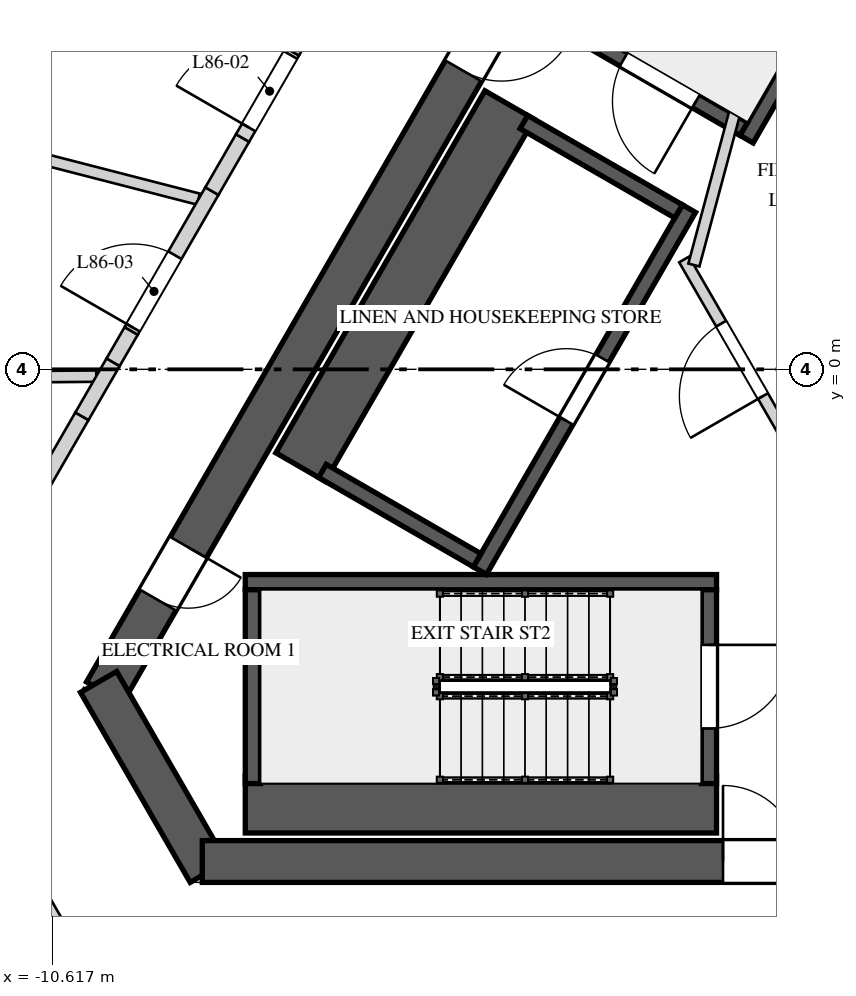
"""IFC4 building model, lengths in metres.
Left out: names, types, materials, properties, quantities, classifications, styles, units other than length and angle.
Written with IfcOpenShell. Run it as: python <this file> out.ifc"""

import sys

from ifc_helpers import new_model, si_unit, direction, frame, frame_2d, origin, place, context, subcontext, project, spatial, polyline, rectangle, outline, extrude, element, fill, save


model = new_model("IFC4")
c1 = context("Model", 3, precision=1e-05, world=origin(), true_north=direction((0.0, 1.0)))
c2 = subcontext(c1, "Body", "Model", "MODEL_VIEW")
j1 = project(units=[si_unit("LENGTHUNIT", "METRE"), si_unit("PLANEANGLEUNIT", "RADIAN")], contexts=[c1])
p1 = place(None, origin())
s1 = spatial("IfcSite", under=j1, at=p1, CompositionType="ELEMENT")
p2 = place(p1, origin())
s2 = spatial("IfcBuilding", under=s1, at=p2, CompositionType="ELEMENT")
p3 = place(p2, frame((0.0, 0.0, 374.9)))
s3 = spatial("IfcBuildingStorey", under=s2, at=p3, CompositionType="ELEMENT", Elevation=374.9)
p4 = place(p3, frame((-1.285, 10.725, 0.0), z_axis=(0.0, 0.0, 1.0), x_axis=(-0.499994590896, -0.86602852671, 0.0)))
e1 = element("IfcWall", 1, at=p4, inside=s3, PredefinedType="SHEAR", context=c2, shape_type="SweptSolid", body=[
    extrude(rectangle(XDim=17.292, YDim=0.55, at=frame_2d((8.646, 0.0))), origin(), (0.0, 0.0, 1.0), 6.0),
])
p5 = place(p4, frame((6.851, 0.0, 0.0)))
e2 = element("IfcOpeningElement", 2, at=p5, cuts=e1, PredefinedType="OPENING", context=c2, shape_type="SweptSolid", body=[
    extrude(rectangle(XDim=1.0, YDim=2.4, at=frame_2d((0.5, 1.2))), frame((0.0, 0.285, 0.0), z_axis=(0.0, -1.0, 0.0), x_axis=(1.0, 0.0, 0.0)), (0.0, 0.0, 1.0), 0.57),
])
p6 = place(p4, frame((15.089, 0.0, 0.0)))
e3 = element("IfcOpeningElement", 3, at=p6, cuts=e1, PredefinedType="OPENING", context=c2, shape_type="SweptSolid", body=[
    extrude(rectangle(XDim=0.8, YDim=2.1, at=frame_2d((0.4, 1.05))), frame((0.0, 0.285, 0.0), z_axis=(0.0, -1.0, 0.0), x_axis=(1.0, 0.0, 0.0)), (0.0, 0.0, 1.0), 0.57),
])
p7 = place(p3, frame((-10.01, -4.113, 0.0), z_axis=(0.0, 0.0, 1.0), x_axis=(0.499995765644, -0.866027848477, 0.0)))
e4 = element("IfcWall", 4, at=p7, inside=s3, PredefinedType="SHEAR", context=c2, shape_type="SweptSolid", body=[
    extrude(rectangle(XDim=2.887, YDim=0.55, at=frame_2d((1.443, 0.0))), origin(), (0.0, 0.0, 1.0), 6.0),
])
p8 = place(p3, frame((-8.646, -6.475, 0.0), z_axis=(0.0, 0.0, 1.0), x_axis=(1.0, 0.0, 0.0)))
e5 = element("IfcWall", 5, at=p8, inside=s3, PredefinedType="SHEAR", context=c2, shape_type="SweptSolid", body=[
    extrude(rectangle(XDim=17.292, YDim=0.55, at=frame_2d((8.646, 0.0))), origin(), (0.0, 0.0, 1.0), 6.0),
])
p9 = place(p8, frame((6.851, 0.0, 0.0)))
e6 = element("IfcOpeningElement", 6, at=p9, cuts=e5, PredefinedType="OPENING", context=c2, shape_type="SweptSolid", body=[
    extrude(rectangle(XDim=1.0, YDim=2.4, at=frame_2d((0.5, 1.2))), frame((0.0, 0.285, 0.0), z_axis=(0.0, -1.0, 0.0), x_axis=(1.0, 0.0, 0.0)), (0.0, 0.0, 1.0), 0.57),
])
p10 = place(p3, frame((-13.093, -6.868, 0.0), z_axis=(0.0, 0.0, 1.0), x_axis=(0.669136224502, -0.74313976684, 0.0)))
e7 = element("IfcWall", 7, at=p10, inside=s3, PredefinedType="SOLIDWALL", context=c2, shape_type="SweptSolid", body=[
    extrude(rectangle(XDim=7.314, YDim=0.45, at=frame_2d((3.657, 0.0))), origin(), (0.0, 0.0, 1.0), 5.3),
])
p11 = place(p3, frame((1.615, 8.397, 0.0), z_axis=(0.0, 0.0, 1.0), x_axis=(-0.500009909098, -0.866019682689, 0.0)))
e8 = element("IfcWall", 8, at=p11, inside=s3, PredefinedType="SOLIDWALL", context=c2, shape_type="SweptSolid", body=[
    extrude(rectangle(XDim=6.2, YDim=0.2, at=frame_2d((3.1, 0.0))), origin(), (0.0, 0.0, 1.0), 5.65),
])
p12 = place(p3, frame((-1.521, 3.165, 0.0), z_axis=(0.0, 0.0, 1.0), x_axis=(-0.866030925526, 0.499990435942, 0.0)))
e9 = element("IfcWall", 9, at=p12, inside=s3, PredefinedType="SOLIDWALL", context=c2, shape_type="SweptSolid", body=[
    extrude(rectangle(XDim=2.55, YDim=0.2, at=frame_2d((1.275, 0.0))), origin(), (0.0, 0.0, 1.0), 5.65),
])
p13 = place(p12, frame((0.725, 0.0, 0.0)))
e10 = element("IfcOpeningElement", 10, at=p13, cuts=e9, PredefinedType="OPENING", context=c2, shape_type="SweptSolid", body=[
    extrude(rectangle(XDim=1.1, YDim=2.4, at=frame_2d((0.55, 1.2))), frame((0.0, 0.11, 0.0), z_axis=(0.0, -1.0, 0.0), x_axis=(1.0, 0.0, 0.0)), (0.0, 0.0, 1.0), 0.22),
])
p14 = place(p3, frame((-8.08, -5.725, 0.0), z_axis=(0.0, 0.0, 1.0), x_axis=(1.0, 0.0, 0.0)))
e11 = element("IfcWall", 11, at=p14, inside=s3, PredefinedType="SOLIDWALL", context=c2, shape_type="SweptSolid", body=[
    extrude(rectangle(XDim=6.2, YDim=0.75, at=frame_2d((3.1, 0.0))), origin(), (0.0, 0.0, 1.0), 5.65),
])
p15 = place(p3, frame((-8.08, -2.8, 0.0), z_axis=(0.0, 0.0, 1.0), x_axis=(1.0, 0.0, 0.0)))
e12 = element("IfcWall", 12, at=p15, inside=s3, PredefinedType="SOLIDWALL", context=c2, shape_type="SweptSolid", body=[
    extrude(rectangle(XDim=6.2, YDim=0.2, at=frame_2d((3.1, 0.0))), origin(), (0.0, 0.0, 1.0), 5.65),
])
p16 = place(p3, frame((-7.98, -2.9, 0.0), z_axis=(0.0, 0.0, 1.0), x_axis=(0.0, -1.0, 0.0)))
e13 = element("IfcWall", 13, at=p16, inside=s3, PredefinedType="SOLIDWALL", context=c2, shape_type="SweptSolid", body=[
    extrude(rectangle(XDim=2.55, YDim=0.2, at=frame_2d((1.275, 0.0))), origin(), (0.0, 0.0, 1.0), 5.65),
])
p17 = place(p3, frame((-1.98, -2.9, 0.0), z_axis=(0.0, 0.0, 1.0), x_axis=(0.0, -1.0, 0.0)))
e14 = element("IfcWall", 14, at=p17, inside=s3, PredefinedType="SOLIDWALL", context=c2, shape_type="SweptSolid", body=[
    extrude(rectangle(XDim=2.55, YDim=0.2, at=frame_2d((1.275, 0.0))), origin(), (0.0, 0.0, 1.0), 5.65),
])
p18 = place(p17, frame((0.725, 0.0, 0.0)))
e15 = element("IfcOpeningElement", 15, at=p18, cuts=e14, PredefinedType="OPENING", context=c2, shape_type="SweptSolid", body=[
    extrude(rectangle(XDim=1.1, YDim=2.4, at=frame_2d((0.55, 1.2))), frame((0.0, 0.11, 0.0), z_axis=(0.0, -1.0, 0.0), x_axis=(1.0, 0.0, 0.0)), (0.0, 0.0, 1.0), 0.22),
])
p19 = place(p3, frame((-4.993, -2.648, 0.0), z_axis=(0.0, 0.0, 1.0), x_axis=(0.499996545922, 0.866027397988, 0.0)))
e16 = element("IfcWall", 16, at=p19, inside=s3, PredefinedType="SOLIDWALL", context=c2, shape_type="SweptSolid", body=[
    extrude(rectangle(XDim=5.5, YDim=0.2, at=frame_2d((2.75, 0.0))), origin(), (0.0, 0.0, 1.0), 5.65),
])
p20 = place(p19, frame((2.275, 0.0, 0.0)))
e17 = element("IfcOpeningElement", 17, at=p20, cuts=e16, PredefinedType="OPENING", context=c2, shape_type="SweptSolid", body=[
    extrude(rectangle(XDim=0.95, YDim=2.4, at=frame_2d((0.475, 1.2))), frame((0.0, 0.11, 0.0), z_axis=(0.0, -1.0, 0.0), x_axis=(1.0, 0.0, 0.0)), (0.0, 0.0, 1.0), 0.22),
])
p21 = place(p3, frame((-4.603, 3.477, 0.0), z_axis=(0.0, 0.0, 1.0), x_axis=(-0.500015767406, -0.866016300277, 0.0)))
e18 = element("IfcWall", 18, at=p21, inside=s3, PredefinedType="SOLIDWALL", context=c2, shape_type="SweptSolid", body=[
    extrude(rectangle(XDim=5.5, YDim=0.75, at=frame_2d((2.75, 0.0))), origin(), (0.0, 0.0, 1.0), 5.65),
])
p22 = place(p3, frame((-2.38, 2.078, 0.0), z_axis=(0.0, 0.0, 1.0), x_axis=(-0.866061024631, 0.499938297808, 0.0)))
e19 = element("IfcWall", 19, at=p22, inside=s3, PredefinedType="SOLIDWALL", context=c2, shape_type="SweptSolid", body=[
    extrude(rectangle(XDim=2.35, YDim=0.2, at=frame_2d((1.175, 0.0))), origin(), (0.0, 0.0, 1.0), 5.65),
])
p23 = place(p3, frame((-5.03, -2.512, 0.0), z_axis=(0.0, 0.0, 1.0), x_axis=(-0.866016039709, 0.500016218704, 0.0)))
e20 = element("IfcWall", 20, at=p23, inside=s3, PredefinedType="SOLIDWALL", context=c2, shape_type="SweptSolid", body=[
    extrude(rectangle(XDim=2.35, YDim=0.2, at=frame_2d((1.175, 0.0))), origin(), (0.0, 0.0, 1.0), 5.65),
])
p24 = place(p3, frame((-0.744, -1.261, 0.0), z_axis=(0.0, 0.0, 1.0), x_axis=(-0.500004234368, 0.866022959057, 0.0)))
e21 = element("IfcWall", 21, at=p24, inside=s3, PredefinedType="PARTITIONING", context=c2, shape_type="SweptSolid", body=[
    extrude(rectangle(XDim=3.125, YDim=0.15, at=frame_2d((1.562, 0.0))), origin(), (0.0, 0.0, 1.0), 5.65),
])
p25 = place(p24, frame((1.05, 0.0, 0.0)))
e22 = element("IfcOpeningElement", 22, at=p25, cuts=e21, PredefinedType="OPENING", context=c2, shape_type="SweptSolid", body=[
    extrude(rectangle(XDim=1.1, YDim=2.4, at=frame_2d((0.55, 1.2))), frame((0.0, 0.085, 0.0), z_axis=(0.0, -1.0, 0.0), x_axis=(1.0, 0.0, 0.0)), (0.0, 0.0, 1.0), 0.17),
])
p26 = place(p3, frame((-2.178, 1.372, 0.0), z_axis=(0.0, 0.0, 1.0), x_axis=(0.258808958833, 0.96592852884, 0.0)))
e23 = element("IfcWall", 23, at=p26, inside=s3, PredefinedType="PARTITIONING", context=c2, shape_type="SweptSolid", body=[
    extrude(rectangle(XDim=2.903, YDim=0.15, at=frame_2d((1.451, 0.0))), origin(), (0.0, 0.0, 1.0), 5.65),
])
p27 = place(p3, frame((-1.51, 4.215, 0.0), z_axis=(0.0, 0.0, 1.0), x_axis=(0.866085525409, 0.49989585183, 0.0)))
e24 = element("IfcWall", 24, at=p27, inside=s3, PredefinedType="PARTITIONING", context=c2, shape_type="SweptSolid", body=[
    extrude(rectangle(XDim=1.3, YDim=0.15, at=frame_2d((0.65, 0.0))), origin(), (0.0, 0.0, 1.0), 5.65),
])
p28 = place(p3, frame((-10.04, -0.089, 0.0), z_axis=(0.0, 0.0, 1.0), x_axis=(-0.999960441248, -0.00889471414, 0.0)))
e25 = element("IfcWall", 25, at=p28, inside=s3, PredefinedType="PARTITIONING", context=c2, shape_type="SweptSolid", body=[
    extrude(rectangle(XDim=8.783, YDim=0.15, at=frame_2d((4.392, 0.0))), origin(), (0.0, 0.0, 1.0), 4.95),
])
p29 = place(p3, frame((-8.696, 2.239, 0.0), z_axis=(0.0, 0.0, 1.0), x_axis=(-0.968413242645, 0.249350739864, 0.0)))
e26 = element("IfcWall", 26, at=p29, inside=s3, PredefinedType="PARTITIONING", context=c2, shape_type="SweptSolid", body=[
    extrude(rectangle(XDim=3.739, YDim=0.15, at=frame_2d((1.87, 0.0))), origin(), (0.0, 0.0, 1.0), 4.55),
])
p30 = place(p3, frame((-9.844, -8.55, 0.0), z_axis=(0.0, 0.0, 1.0), x_axis=(-0.500003959331, 0.866023117852, 0.0)))
e27 = element("IfcWall", 27, at=p30, inside=s3, PredefinedType="SOLIDWALL", context=c2, shape_type="SweptSolid", body=[
    extrude(rectangle(XDim=3.003, YDim=0.2, at=frame_2d((1.501, 0.0))), origin(), (0.0, 0.0, 1.0), 5.65),
])
p31 = place(p3, frame((-12.326, -4.25, 0.0), z_axis=(0.0, 0.0, 1.0), x_axis=(0.499982771656, 0.866035350345, 0.0)))
e28 = element("IfcWall", 28, at=p31, inside=s3, PredefinedType="SOLIDWALL", context=c2, shape_type="SweptSolid", body=[
    extrude(rectangle(XDim=4.195, YDim=0.2, at=frame_2d((2.097, 0.0))), origin(), (0.0, 0.0, 1.0), 5.65),
])
p32 = place(p3, frame((-10.229, -0.617, 0.0), z_axis=(0.0, 0.0, 1.0), x_axis=(0.5001686003, 0.865928040471, 0.0)))
e29 = element("IfcWall", 29, at=p32, inside=s3, PredefinedType="SOLIDWALL", context=c2, shape_type="SweptSolid", body=[
    extrude(rectangle(XDim=0.821, YDim=0.2, at=frame_2d((0.411, 0.0))), origin(), (0.0, 0.0, 1.0), 4.95),
])
p33 = place(p3, frame((-9.819, 0.094, 0.0), z_axis=(0.0, 0.0, 1.0), x_axis=(0.500003887042, 0.866023159588, 0.0)))
e30 = element("IfcWall", 30, at=p33, inside=s3, PredefinedType="SOLIDWALL", context=c2, shape_type="SweptSolid", body=[
    extrude(rectangle(XDim=0.476, YDim=0.2, at=frame_2d((0.238, 0.0))), origin(), (0.0, 0.0, 1.0), 5.65),
])
p34 = place(p3, frame((-9.581, 0.505, 0.0), z_axis=(0.0, 0.0, 1.0), x_axis=(0.499984515995, 0.866034343295, 0.0)))
e31 = element("IfcWall", 31, at=p34, inside=s3, PredefinedType="SOLIDWALL", context=c2, shape_type="SweptSolid", body=[
    extrude(outline(polyline([(0.0, 0.0), (2.124, 0.0), (2.124, 4.55), (1.18, 4.55), (1.18, 5.65), (0.0, 5.65), (0.0, 0.0)])), frame((0.0, 0.1, 0.0), z_axis=(0.0, -1.0, 0.0), x_axis=(1.0, 0.0, 0.0)), (0.0, 0.0, 1.0), 0.2),
])
p35 = place(p34, frame((0.05, 0.0, 0.0)))
e32 = element("IfcOpeningElement", 32, at=p35, cuts=e31, PredefinedType="OPENING", context=c2, shape_type="SweptSolid", body=[
    extrude(rectangle(XDim=1.1, YDim=2.4, at=frame_2d((0.55, 1.2))), frame((0.0, 0.11, 0.0), z_axis=(0.0, -1.0, 0.0), x_axis=(1.0, 0.0, 0.0)), (0.0, 0.0, 1.0), 0.22),
])
p36 = place(p3, frame((-8.519, 2.344, 0.0), z_axis=(0.0, 0.0, 1.0), x_axis=(0.499914554297, 0.866074730264, 0.0)))
e33 = element("IfcWall", 33, at=p36, inside=s3, PredefinedType="SOLIDWALL", context=c2, shape_type="SweptSolid", body=[
    extrude(rectangle(XDim=0.807, YDim=0.2, at=frame_2d((0.403, 0.0))), origin(), (0.0, 0.0, 1.0), 5.65),
])
p37 = place(p3, frame((-8.116, 3.043, 0.0), z_axis=(0.0, 0.0, 1.0), x_axis=(0.500023253097, 0.866011978186, 0.0)))
e34 = element("IfcWall", 34, at=p37, inside=s3, PredefinedType="SOLIDWALL", context=c2, shape_type="SweptSolid", body=[
    extrude(outline(polyline([(0.0, 0.0), (1.312, 0.0), (1.311, 5.65), (0.906, 5.65), (0.906, 4.55), (0.0, 4.55), (0.0, 0.0)])), frame((0.0, 0.1, 0.0), z_axis=(0.0, -1.0, 0.0), x_axis=(1.0, 0.0, 0.0)), (0.0, 0.0, 1.0), 0.2),
])
p38 = place(p37, frame((0.161, 0.0, 0.0)))
e35 = element("IfcOpeningElement", 35, at=p38, cuts=e34, PredefinedType="OPENING", context=c2, shape_type="SweptSolid", body=[
    extrude(rectangle(XDim=1.1, YDim=2.4, at=frame_2d((0.55, 1.2))), frame((0.0, 0.11, 0.0), z_axis=(0.0, -1.0, 0.0), x_axis=(1.0, 0.0, 0.0)), (0.0, 0.0, 1.0), 0.22),
])
p39 = place(p3, frame((-7.46, 4.179, 0.0), z_axis=(0.0, 0.0, 1.0), x_axis=(0.499891655525, 0.866087947461, 0.0)))
e36 = element("IfcWall", 36, at=p39, inside=s3, PredefinedType="SOLIDWALL", context=c2, shape_type="SweptSolid", body=[
    extrude(rectangle(XDim=0.833, YDim=0.2, at=frame_2d((0.417, 0.0))), origin(), (0.0, 0.0, 1.0), 5.65),
])
p40 = place(p13, origin())
e37 = element("IfcDoor", 37, at=p40, inside=s3, OperationType="SINGLE_SWING_RIGHT", PredefinedType="DOOR", context=c2, shape_type="SweptSolid", body=[
    extrude(rectangle(XDim=1.1, YDim=2.4, at=frame_2d((0.55, 1.2))), frame((0.0, 0.025, 0.0), z_axis=(0.0, -1.0, 0.0), x_axis=(1.0, 0.0, 0.0)), (0.0, 0.0, 1.0), 0.05),
])
fill(e10, e37)
p41 = place(p18, origin())
e38 = element("IfcDoor", 38, at=p41, inside=s3, OperationType="SINGLE_SWING_LEFT", PredefinedType="DOOR", context=c2, shape_type="SweptSolid", body=[
    extrude(rectangle(XDim=1.1, YDim=2.4, at=frame_2d((0.55, 1.2))), frame((0.0, 0.025, 0.0), z_axis=(0.0, -1.0, 0.0), x_axis=(1.0, 0.0, 0.0)), (0.0, 0.0, 1.0), 0.05),
])
fill(e15, e38)
p42 = place(p20, origin())
e39 = element("IfcDoor", 39, at=p42, inside=s3, OperationType="SINGLE_SWING_LEFT", PredefinedType="DOOR", context=c2, shape_type="SweptSolid", body=[
    extrude(rectangle(XDim=0.95, YDim=2.4, at=frame_2d((0.475, 1.2))), frame((0.0, 0.025, 0.0), z_axis=(0.0, -1.0, 0.0), x_axis=(1.0, 0.0, 0.0)), (0.0, 0.0, 1.0), 0.05),
])
fill(e17, e39)
p43 = place(p25, origin())
e40 = element("IfcDoor", 40, at=p43, inside=s3, OperationType="SINGLE_SWING_LEFT", PredefinedType="DOOR", context=c2, shape_type="SweptSolid", body=[
    extrude(rectangle(XDim=1.1, YDim=2.4, at=frame_2d((0.55, 1.2))), frame((0.0, 0.025, 0.0), z_axis=(0.0, -1.0, 0.0), x_axis=(1.0, 0.0, 0.0)), (0.0, 0.0, 1.0), 0.05),
])
fill(e22, e40)
p44 = place(p5, origin())
e41 = element("IfcDoor", 41, at=p44, inside=s3, OperationType="SINGLE_SWING_RIGHT", PredefinedType="DOOR", context=c2, shape_type="SweptSolid", body=[
    extrude(rectangle(XDim=1.0, YDim=2.4, at=frame_2d((0.5, 1.2))), frame((0.0, 0.025, 0.0), z_axis=(0.0, -1.0, 0.0), x_axis=(1.0, 0.0, 0.0)), (0.0, 0.0, 1.0), 0.05),
])
fill(e2, e41)
p45 = place(p9, origin())
e42 = element("IfcDoor", 42, at=p45, inside=s3, OperationType="SINGLE_SWING_LEFT", PredefinedType="DOOR", context=c2, shape_type="SweptSolid", body=[
    extrude(rectangle(XDim=1.0, YDim=2.4, at=frame_2d((0.5, 1.2))), frame((0.0, 0.025, 0.0), z_axis=(0.0, -1.0, 0.0), x_axis=(1.0, 0.0, 0.0)), (0.0, 0.0, 1.0), 0.05),
])
fill(e6, e42)
p46 = place(p6, origin())
e43 = element("IfcDoor", 43, at=p46, inside=s3, OperationType="SINGLE_SWING_LEFT", PredefinedType="DOOR", context=c2, shape_type="SweptSolid", body=[
    extrude(rectangle(XDim=0.8, YDim=2.1, at=frame_2d((0.4, 1.05))), frame((0.0, 0.025, 0.0), z_axis=(0.0, -1.0, 0.0), x_axis=(1.0, 0.0, 0.0)), (0.0, 0.0, 1.0), 0.05),
])
fill(e3, e43)
p47 = place(p38, origin())
e44 = element("IfcDoor", 44, at=p47, inside=s3, OperationType="SINGLE_SWING_LEFT", PredefinedType="DOOR", context=c2, shape_type="SweptSolid", body=[
    extrude(rectangle(XDim=1.1, YDim=2.4, at=frame_2d((0.55, 1.2))), frame((0.0, 0.025, 0.0), z_axis=(0.0, -1.0, 0.0), x_axis=(1.0, 0.0, 0.0)), (0.0, 0.0, 1.0), 0.05),
])
fill(e35, e44)
p48 = place(p35, origin())
e45 = element("IfcDoor", 45, at=p48, inside=s3, OperationType="SINGLE_SWING_RIGHT", PredefinedType="DOOR", context=c2, shape_type="SweptSolid", body=[
    extrude(rectangle(XDim=1.1, YDim=2.4, at=frame_2d((0.55, 1.2))), frame((0.0, 0.025, 0.0), z_axis=(0.0, -1.0, 0.0), x_axis=(1.0, 0.0, 0.0)), (0.0, 0.0, 1.0), 0.05),
])
fill(e32, e45)
save(model, sys.argv[1])
